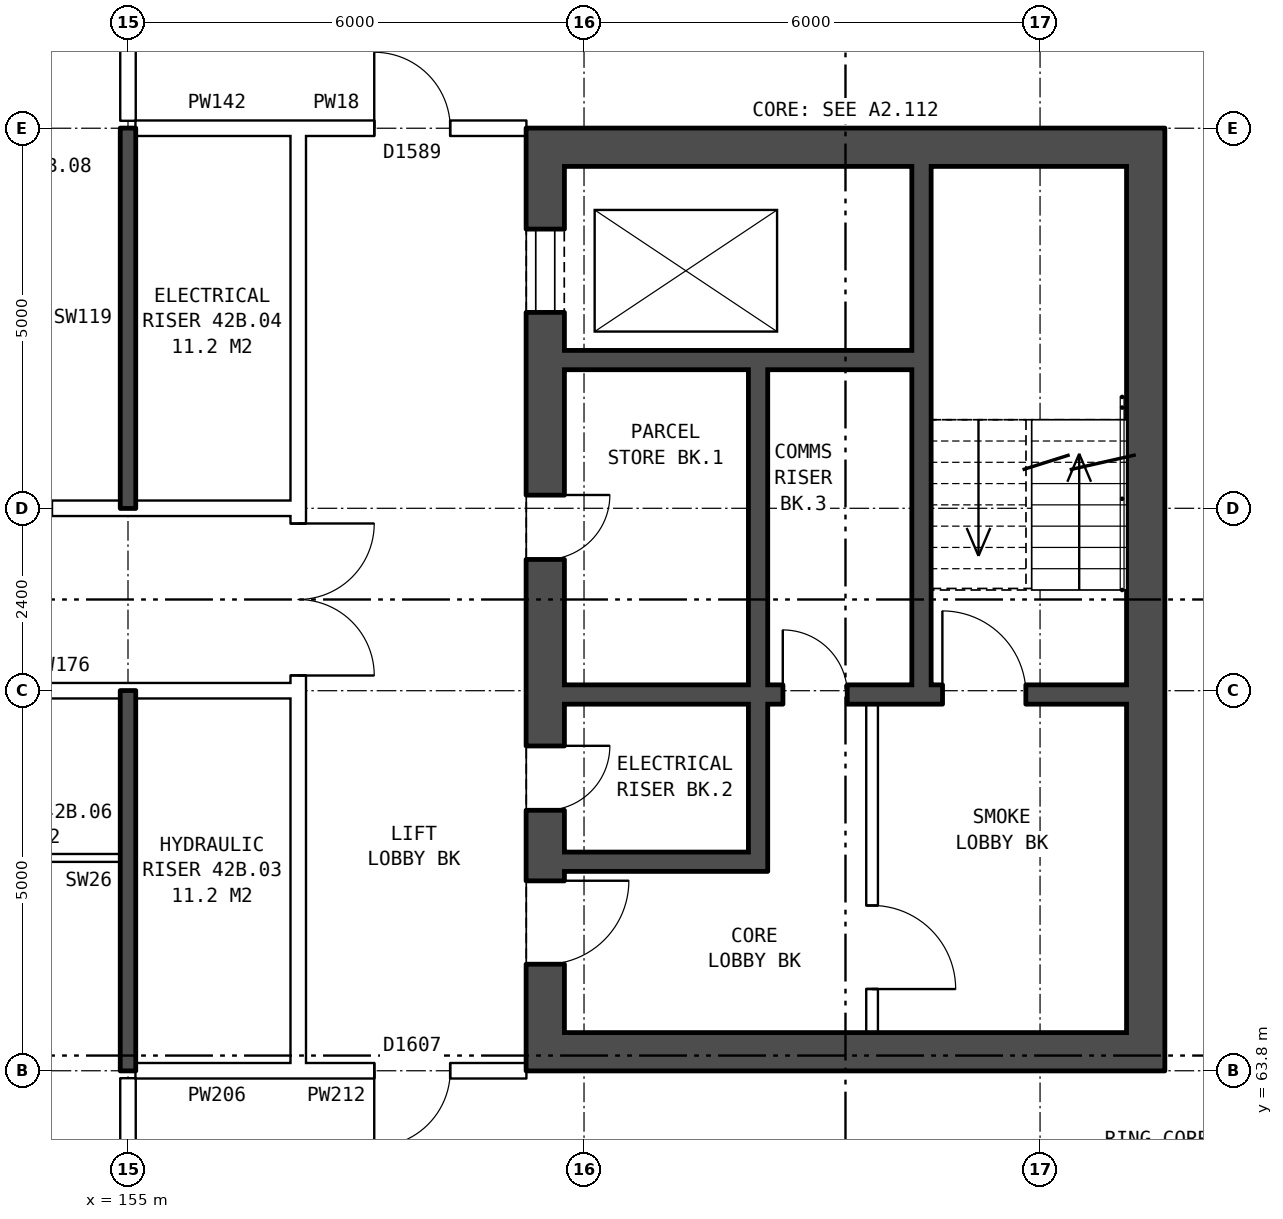
"""IFC4 building model, lengths in metres.
Left out: names, types, materials, properties, quantities, classifications, styles, units other than length and angle.
Written with IfcOpenShell. Run it as: python <this file> out.ifc"""

import sys

from ifc_helpers import new_model, si_unit, direction, frame, frame_2d, origin, place, context, subcontext, project, spatial, rectangle, extrude, element, fill, save


model = new_model("IFC4")
c1 = context("Model", 3, precision=1e-05, world=origin(), true_north=direction((0.0, 1.0)))
c2 = subcontext(c1, "Body", "Model", "MODEL_VIEW")
j1 = project(units=[si_unit("LENGTHUNIT", "METRE"), si_unit("PLANEANGLEUNIT", "RADIAN")], contexts=[c1])
p1 = place(None, origin())
s1 = spatial("IfcSite", under=j1, at=p1, CompositionType="ELEMENT")
p2 = place(p1, origin())
s2 = spatial("IfcBuilding", under=s1, at=p2, CompositionType="ELEMENT")
p3 = place(p2, frame((0.0, 0.0, 151.6)))
s3 = spatial("IfcBuildingStorey", under=s2, at=p3, CompositionType="ELEMENT", Elevation=151.6)
p4 = place(p3, frame((160.49, 76.2, 0.0), z_axis=(0.0, 0.0, 1.0), x_axis=(0.0, -1.0, 0.0)))
e1 = element("IfcWall", 1, at=p4, inside=s3, PredefinedType="SHEAR", context=c2, shape_type="SweptSolid", body=[
    extrude(rectangle(XDim=12.4, YDim=0.5, at=frame_2d((6.2, 0.0))), origin(), (0.0, 0.0, 1.0), 2.85),
])
p5 = place(p4, frame((1.325, 0.0, 0.0)))
e2 = element("IfcOpeningElement", 2, at=p5, cuts=e1, PredefinedType="OPENING", context=c2, shape_type="SweptSolid", body=[
    extrude(rectangle(XDim=1.1, YDim=2.1, at=frame_2d((0.55, 1.05))), frame((0.0, 0.26, 0.0), z_axis=(0.0, -1.0, 0.0), x_axis=(1.0, 0.0, 0.0)), (0.0, 0.0, 1.0), 0.52),
])
p6 = place(p4, frame((4.825, 0.0, 0.0)))
e3 = element("IfcOpeningElement", 3, at=p6, cuts=e1, PredefinedType="OPENING", context=c2, shape_type="SweptSolid", body=[
    extrude(rectangle(XDim=0.85, YDim=2.1, at=frame_2d((0.425, 1.05))), frame((0.0, 0.26, 0.0), z_axis=(0.0, -1.0, 0.0), x_axis=(1.0, 0.0, 0.0)), (0.0, 0.0, 1.0), 0.52),
])
p7 = place(p4, frame((9.9, 0.0, 0.0)))
e4 = element("IfcOpeningElement", 4, at=p7, cuts=e1, PredefinedType="OPENING", context=c2, shape_type="SweptSolid", body=[
    extrude(rectangle(XDim=1.1, YDim=2.1, at=frame_2d((0.55, 1.05))), frame((0.0, 0.26, 0.0), z_axis=(0.0, -1.0, 0.0), x_axis=(1.0, 0.0, 0.0)), (0.0, 0.0, 1.0), 0.52),
])
p8 = place(p4, frame((8.125, 0.0, 0.0)))
e5 = element("IfcOpeningElement", 5, at=p8, cuts=e1, PredefinedType="OPENING", context=c2, shape_type="SweptSolid", body=[
    extrude(rectangle(XDim=0.85, YDim=2.1, at=frame_2d((0.425, 1.05))), frame((0.0, 0.26, 0.0), z_axis=(0.0, -1.0, 0.0), x_axis=(1.0, 0.0, 0.0)), (0.0, 0.0, 1.0), 0.52),
])
p9 = place(p3, frame((168.39, 76.2, 0.0), z_axis=(0.0, 0.0, 1.0), x_axis=(0.0, -1.0, 0.0)))
e6 = element("IfcWall", 6, at=p9, inside=s3, PredefinedType="SHEAR", context=c2, shape_type="SweptSolid", body=[
    extrude(rectangle(XDim=12.4, YDim=0.5, at=frame_2d((6.2, 0.0))), origin(), (0.0, 0.0, 1.0), 2.85),
])
for number, where, z_axis, x_axis in (
    (7, (160.74, 75.95, 0.0), (0.0, 0.0, 1.0), (1.0, 0.0, 0.0)),
    (8, (160.74, 64.05, 0.0), (0.0, 0.0, 1.0), (1.0, 0.0, 0.0)),
):
    element("IfcWall", number, at=place(p3, frame(where, z_axis=z_axis, x_axis=x_axis)), inside=s3, PredefinedType="SHEAR", context=c2, shape_type="SweptSolid", body=[
        extrude(rectangle(XDim=7.4, YDim=0.5, at=frame_2d((3.7, 0.0))), origin(), (0.0, 0.0, 1.0), 2.85),
    ])
p10 = place(p3, frame((160.74, 73.15, 0.0), z_axis=(0.0, 0.0, 1.0), x_axis=(1.0, 0.0, 0.0)))
e9 = element("IfcWall", 9, at=p10, inside=s3, PredefinedType="SHEAR", context=c2, shape_type="SweptSolid", body=[
    extrude(rectangle(XDim=4.575, YDim=0.25, at=frame_2d((2.288, 0.0))), origin(), (0.0, 0.0, 1.0), 2.85),
])
p11 = place(p3, frame((160.74, 68.75, 0.0), z_axis=(0.0, 0.0, 1.0), x_axis=(1.0, 0.0, 0.0)))
e10 = element("IfcWall", 10, at=p11, inside=s3, PredefinedType="SHEAR", context=c2, shape_type="SweptSolid", body=[
    extrude(rectangle(XDim=7.4, YDim=0.25, at=frame_2d((3.7, 0.0))), origin(), (0.0, 0.0, 1.0), 2.85),
])
p12 = place(p11, frame((4.975, 0.0, 0.0)))
e11 = element("IfcOpeningElement", 11, at=p12, cuts=e10, PredefinedType="OPENING", context=c2, shape_type="SweptSolid", body=[
    extrude(rectangle(XDim=1.1, YDim=2.1, at=frame_2d((0.55, 1.05))), frame((0.0, 0.135, 0.0), z_axis=(0.0, -1.0, 0.0), x_axis=(1.0, 0.0, 0.0)), (0.0, 0.0, 1.0), 0.27),
])
p13 = place(p11, frame((2.875, 0.0, 0.0)))
e12 = element("IfcOpeningElement", 12, at=p13, cuts=e10, PredefinedType="OPENING", context=c2, shape_type="SweptSolid", body=[
    extrude(rectangle(XDim=0.85, YDim=2.1, at=frame_2d((0.425, 1.05))), frame((0.0, 0.135, 0.0), z_axis=(0.0, -1.0, 0.0), x_axis=(1.0, 0.0, 0.0)), (0.0, 0.0, 1.0), 0.27),
])
p14 = place(p3, frame((160.74, 66.55, 0.0), z_axis=(0.0, 0.0, 1.0), x_axis=(1.0, 0.0, 0.0)))
e13 = element("IfcWall", 13, at=p14, inside=s3, PredefinedType="SHEAR", context=c2, shape_type="SweptSolid", body=[
    extrude(rectangle(XDim=2.425, YDim=0.25, at=frame_2d((1.212, 0.0))), origin(), (0.0, 0.0, 1.0), 2.85),
])
p15 = place(p3, frame((163.29, 73.025, 0.0), z_axis=(0.0, 0.0, 1.0), x_axis=(0.0, -1.0, 0.0)))
e14 = element("IfcWall", 14, at=p15, inside=s3, PredefinedType="SHEAR", context=c2, shape_type="SweptSolid", body=[
    extrude(rectangle(XDim=4.15, YDim=0.25, at=frame_2d((2.075, 0.0))), origin(), (0.0, 0.0, 1.0), 2.85),
])
p16 = place(p3, frame((163.29, 68.625, 0.0), z_axis=(0.0, 0.0, 1.0), x_axis=(0.0, -1.0, 0.0)))
e15 = element("IfcWall", 15, at=p16, inside=s3, PredefinedType="SHEAR", context=c2, shape_type="SweptSolid", body=[
    extrude(rectangle(XDim=2.2, YDim=0.25, at=frame_2d((1.1, 0.0))), origin(), (0.0, 0.0, 1.0), 2.85),
])
p17 = place(p3, frame((164.79, 68.625, 0.0), z_axis=(0.0, 0.0, 1.0), x_axis=(0.0, -1.0, 0.0)))
e16 = element("IfcWall", 16, at=p17, inside=s3, PredefinedType="PARTITIONING", context=c2, shape_type="SweptSolid", body=[
    extrude(rectangle(XDim=4.325, YDim=0.15, at=frame_2d((2.163, 0.0))), origin(), (0.0, 0.0, 1.0), 2.85),
])
p18 = place(p17, frame((2.65, 0.0, 0.0)))
e17 = element("IfcOpeningElement", 17, at=p18, cuts=e16, PredefinedType="OPENING", context=c2, shape_type="SweptSolid", body=[
    extrude(rectangle(XDim=1.1, YDim=2.1, at=frame_2d((0.55, 1.05))), frame((0.0, 0.085, 0.0), z_axis=(0.0, -1.0, 0.0), x_axis=(1.0, 0.0, 0.0)), (0.0, 0.0, 1.0), 0.17),
])
p19 = place(p3, frame((165.44, 75.7, 0.0), z_axis=(0.0, 0.0, 1.0), x_axis=(0.0, -1.0, 0.0)))
e18 = element("IfcWall", 18, at=p19, inside=s3, PredefinedType="SHEAR", context=c2, shape_type="SweptSolid", body=[
    extrude(rectangle(XDim=6.825, YDim=0.25, at=frame_2d((3.413, 0.0))), origin(), (0.0, 0.0, 1.0), 2.85),
])
p20 = place(p3, frame((157.24, 63.9, 0.0), z_axis=(0.0, 0.0, 1.0), x_axis=(0.0, 1.0, 0.0)))
e19 = element("IfcWall", 19, at=p20, inside=s3, PredefinedType="PARTITIONING", context=c2, shape_type="SweptSolid", body=[
    extrude(rectangle(XDim=12.2, YDim=0.2, at=frame_2d((6.1, 0.0))), origin(), (0.0, 0.0, 1.0), 2.85),
])
p21 = place(p20, frame((5.1, 0.0, 0.0)))
e20 = element("IfcOpeningElement", 20, at=p21, cuts=e19, PredefinedType="OPENING", context=c2, shape_type="SweptSolid", body=[
    extrude(rectangle(XDim=2.0, YDim=2.1, at=frame_2d((1.0, 1.05))), frame((0.0, 0.11, 0.0), z_axis=(0.0, -1.0, 0.0), x_axis=(1.0, 0.0, 0.0)), (0.0, 0.0, 1.0), 0.22),
])
p22 = place(p3, frame((155.1, 63.8, 0.0), z_axis=(0.0, 0.0, 1.0), x_axis=(1.0, 0.0, 0.0)))
e21 = element("IfcWall", 21, at=p22, inside=s3, PredefinedType="PARTITIONING", context=c2, shape_type="SweptSolid", body=[
    extrude(rectangle(XDim=2.14, YDim=0.2, at=frame_2d((1.07, 0.0))), origin(), (0.0, 0.0, 1.0), 2.85),
])
p23 = place(p3, frame((157.24, 63.8, 0.0), z_axis=(0.0, 0.0, 1.0), x_axis=(1.0, 0.0, 0.0)))
e22 = element("IfcWall", 22, at=p23, inside=s3, PredefinedType="PARTITIONING", context=c2, shape_type="SweptSolid", body=[
    extrude(rectangle(XDim=3.0, YDim=0.2, at=frame_2d((1.5, 0.0))), origin(), (0.0, 0.0, 1.0), 2.85),
])
p24 = place(p23, frame((1.0, 0.0, 0.0)))
e23 = element("IfcOpeningElement", 23, at=p24, cuts=e22, PredefinedType="OPENING", context=c2, shape_type="SweptSolid", body=[
    extrude(rectangle(XDim=1.0, YDim=2.1, at=frame_2d((0.5, 1.05))), frame((0.0, 0.11, 0.0), z_axis=(0.0, -1.0, 0.0), x_axis=(1.0, 0.0, 0.0)), (0.0, 0.0, 1.0), 0.22),
])
p25 = place(p3, frame((152.0, 66.6, 0.0), z_axis=(0.0, 0.0, 1.0), x_axis=(1.0, 0.0, 0.0)))
e24 = element("IfcWall", 24, at=p25, inside=s3, PredefinedType="PARTITIONING", context=c2, shape_type="SweptSolid", body=[
    extrude(rectangle(XDim=2.9, YDim=0.1, at=frame_2d((1.45, 0.0))), origin(), (0.0, 0.0, 1.0), 2.85),
])
p26 = place(p3, frame((142.76, 68.8, 0.0), z_axis=(0.0, 0.0, 1.0), x_axis=(1.0, 0.0, 0.0)))
e25 = element("IfcWall", 25, at=p26, inside=s3, PredefinedType="PARTITIONING", context=c2, shape_type="SweptSolid", body=[
    extrude(rectangle(XDim=14.48, YDim=0.2, at=frame_2d((7.24, 0.0))), origin(), (0.0, 0.0, 1.0), 2.85),
])
p27 = place(p26, frame((1.12, 0.0, 0.0)))
e26 = element("IfcOpeningElement", 26, at=p27, cuts=e25, PredefinedType="OPENING", context=c2, shape_type="SweptSolid", body=[
    extrude(rectangle(XDim=1.0, YDim=2.1, at=frame_2d((0.5, 1.05))), frame((0.0, 0.11, 0.0), z_axis=(0.0, -1.0, 0.0), x_axis=(1.0, 0.0, 0.0)), (0.0, 0.0, 1.0), 0.22),
])
p28 = place(p26, frame((7.24, 0.0, 0.0)))
e27 = element("IfcOpeningElement", 27, at=p28, cuts=e25, PredefinedType="OPENING", context=c2, shape_type="SweptSolid", body=[
    extrude(rectangle(XDim=1.0, YDim=2.1, at=frame_2d((0.5, 1.05))), frame((0.0, 0.11, 0.0), z_axis=(0.0, -1.0, 0.0), x_axis=(1.0, 0.0, 0.0)), (0.0, 0.0, 1.0), 0.22),
])
p29 = place(p3, frame((142.76, 71.2, 0.0), z_axis=(0.0, 0.0, 1.0), x_axis=(1.0, 0.0, 0.0)))
e28 = element("IfcWall", 28, at=p29, inside=s3, PredefinedType="PARTITIONING", context=c2, shape_type="SweptSolid", body=[
    extrude(rectangle(XDim=14.48, YDim=0.2, at=frame_2d((7.24, 0.0))), origin(), (0.0, 0.0, 1.0), 2.85),
])
p30 = place(p29, frame((4.24, 0.0, 0.0)))
e29 = element("IfcOpeningElement", 29, at=p30, cuts=e28, PredefinedType="OPENING", context=c2, shape_type="SweptSolid", body=[
    extrude(rectangle(XDim=1.0, YDim=2.1, at=frame_2d((0.5, 1.05))), frame((0.0, 0.11, 0.0), z_axis=(0.0, -1.0, 0.0), x_axis=(1.0, 0.0, 0.0)), (0.0, 0.0, 1.0), 0.22),
])
p31 = place(p29, frame((10.24, 0.0, 0.0)))
e30 = element("IfcOpeningElement", 30, at=p31, cuts=e28, PredefinedType="OPENING", context=c2, shape_type="SweptSolid", body=[
    extrude(rectangle(XDim=1.0, YDim=2.1, at=frame_2d((0.5, 1.05))), frame((0.0, 0.11, 0.0), z_axis=(0.0, -1.0, 0.0), x_axis=(1.0, 0.0, 0.0)), (0.0, 0.0, 1.0), 0.22),
])
p32 = place(p3, frame((155.1, 76.2, 0.0), z_axis=(0.0, 0.0, 1.0), x_axis=(1.0, 0.0, 0.0)))
e31 = element("IfcWall", 31, at=p32, inside=s3, PredefinedType="PARTITIONING", context=c2, shape_type="SweptSolid", body=[
    extrude(rectangle(XDim=2.14, YDim=0.2, at=frame_2d((1.07, 0.0))), origin(), (0.0, 0.0, 1.0), 2.85),
])
p33 = place(p3, frame((157.24, 76.2, 0.0), z_axis=(0.0, 0.0, 1.0), x_axis=(1.0, 0.0, 0.0)))
e32 = element("IfcWall", 32, at=p33, inside=s3, PredefinedType="PARTITIONING", context=c2, shape_type="SweptSolid", body=[
    extrude(rectangle(XDim=3.0, YDim=0.2, at=frame_2d((1.5, 0.0))), origin(), (0.0, 0.0, 1.0), 2.85),
])
p34 = place(p33, frame((1.0, 0.0, 0.0)))
e33 = element("IfcOpeningElement", 33, at=p34, cuts=e32, PredefinedType="OPENING", context=c2, shape_type="SweptSolid", body=[
    extrude(rectangle(XDim=1.0, YDim=2.1, at=frame_2d((0.5, 1.05))), frame((0.0, 0.11, 0.0), z_axis=(0.0, -1.0, 0.0), x_axis=(1.0, 0.0, 0.0)), (0.0, 0.0, 1.0), 0.22),
])
p35 = place(p3, frame((155.0, 61.5, 0.0), z_axis=(0.0, 0.0, 1.0), x_axis=(0.0, 1.0, 0.0)))
e34 = element("IfcWall", 34, at=p35, inside=s3, PredefinedType="PARTITIONING", context=c2, shape_type="SweptSolid", body=[
    extrude(rectangle(XDim=2.2, YDim=0.2, at=frame_2d((1.1, 0.0))), origin(), (0.0, 0.0, 1.0), 2.85),
])
for number, where, z_axis, x_axis in (
    (35, (155.0, 63.8, 0.0), (0.0, 0.0, 1.0), (0.0, 1.0, 0.0)),
    (36, (155.0, 71.2, 0.0), (0.0, 0.0, 1.0), (0.0, 1.0, 0.0)),
):
    element("IfcWall", number, at=place(p3, frame(where, z_axis=z_axis, x_axis=x_axis)), inside=s3, PredefinedType="SOLIDWALL", context=c2, shape_type="SweptSolid", body=[
        extrude(rectangle(XDim=5.0, YDim=0.2, at=frame_2d((2.5, 0.0))), origin(), (0.0, 0.0, 1.0), 2.85),
    ])
p36 = place(p3, frame((155.0, 76.3, 0.0), z_axis=(0.0, 0.0, 1.0), x_axis=(0.0, 1.0, 0.0)))
e37 = element("IfcWall", 37, at=p36, inside=s3, PredefinedType="PARTITIONING", context=c2, shape_type="SweptSolid", body=[
    extrude(rectangle(XDim=2.2, YDim=0.2, at=frame_2d((1.1, 0.0))), origin(), (0.0, 0.0, 1.0), 2.85),
])
p37 = place(p5, origin())
e38 = element("IfcDoor", 38, at=p37, inside=s3, OperationType="DOUBLE_DOOR_SLIDING", PredefinedType="DOOR", context=c2, shape_type="SweptSolid", body=[
    extrude(rectangle(XDim=1.1, YDim=2.1, at=frame_2d((0.55, 1.05))), frame((0.0, 0.235, 0.0), z_axis=(0.0, -1.0, 0.0), x_axis=(1.0, 0.0, 0.0)), (0.0, 0.0, 1.0), 0.05),
])
fill(e2, e38)
p38 = place(p6, origin())
e39 = element("IfcDoor", 39, at=p38, inside=s3, OperationType="SINGLE_SWING_LEFT", PredefinedType="DOOR", context=c2, shape_type="SweptSolid", body=[
    extrude(rectangle(XDim=0.85, YDim=2.1, at=frame_2d((0.425, 1.05))), frame((0.0, 0.235, 0.0), z_axis=(0.0, -1.0, 0.0), x_axis=(1.0, 0.0, 0.0)), (0.0, 0.0, 1.0), 0.05),
])
fill(e3, e39)
p39 = place(p7, origin())
e40 = element("IfcDoor", 40, at=p39, inside=s3, OperationType="SINGLE_SWING_LEFT", PredefinedType="DOOR", context=c2, shape_type="SweptSolid", body=[
    extrude(rectangle(XDim=1.1, YDim=2.1, at=frame_2d((0.55, 1.05))), frame((0.0, 0.235, 0.0), z_axis=(0.0, -1.0, 0.0), x_axis=(1.0, 0.0, 0.0)), (0.0, 0.0, 1.0), 0.05),
])
fill(e4, e40)
p40 = place(p18, origin())
e41 = element("IfcDoor", 41, at=p40, inside=s3, OperationType="SINGLE_SWING_RIGHT", PredefinedType="DOOR", context=c2, shape_type="SweptSolid", body=[
    extrude(rectangle(XDim=1.1, YDim=2.1, at=frame_2d((0.55, 1.05))), frame((0.0, 0.025, 0.0), z_axis=(0.0, -1.0, 0.0), x_axis=(1.0, 0.0, 0.0)), (0.0, 0.0, 1.0), 0.05),
])
fill(e17, e41)
p41 = place(p12, origin())
e42 = element("IfcDoor", 42, at=p41, inside=s3, OperationType="SINGLE_SWING_LEFT", PredefinedType="DOOR", context=c2, shape_type="SweptSolid", body=[
    extrude(rectangle(XDim=1.1, YDim=2.1, at=frame_2d((0.55, 1.05))), frame((0.0, 0.025, 0.0), z_axis=(0.0, -1.0, 0.0), x_axis=(1.0, 0.0, 0.0)), (0.0, 0.0, 1.0), 0.05),
])
fill(e11, e42)
p42 = place(p8, origin())
e43 = element("IfcDoor", 43, at=p42, inside=s3, OperationType="SINGLE_SWING_LEFT", PredefinedType="DOOR", context=c2, shape_type="SweptSolid", body=[
    extrude(rectangle(XDim=0.85, YDim=2.1, at=frame_2d((0.425, 1.05))), frame((0.0, 0.235, 0.0), z_axis=(0.0, -1.0, 0.0), x_axis=(1.0, 0.0, 0.0)), (0.0, 0.0, 1.0), 0.05),
])
fill(e5, e43)
p43 = place(p13, origin())
e44 = element("IfcDoor", 44, at=p43, inside=s3, OperationType="SINGLE_SWING_LEFT", PredefinedType="DOOR", context=c2, shape_type="SweptSolid", body=[
    extrude(rectangle(XDim=0.85, YDim=2.1, at=frame_2d((0.425, 1.05))), frame((0.0, 0.025, 0.0), z_axis=(0.0, -1.0, 0.0), x_axis=(1.0, 0.0, 0.0)), (0.0, 0.0, 1.0), 0.05),
])
fill(e12, e44)
p44 = place(p21, frame((2.0, 0.0, 0.0), z_axis=(0.0, 0.0, 1.0), x_axis=(-1.0, 0.0, 0.0)))
e45 = element("IfcDoor", 45, at=p44, inside=s3, OperationType="DOUBLE_DOOR_SINGLE_SWING", PredefinedType="DOOR", context=c2, shape_type="SweptSolid", body=[
    extrude(rectangle(XDim=2.0, YDim=2.1, at=frame_2d((1.0, 1.05))), frame((0.0, 0.025, 0.0), z_axis=(0.0, -1.0, 0.0), x_axis=(1.0, 0.0, 0.0)), (0.0, 0.0, 1.0), 0.05),
])
fill(e20, e45)
p45 = place(p24, frame((1.0, 0.0, 0.0), z_axis=(0.0, 0.0, 1.0), x_axis=(-1.0, 0.0, 0.0)))
e46 = element("IfcDoor", 46, at=p45, inside=s3, OperationType="SINGLE_SWING_RIGHT", PredefinedType="DOOR", context=c2, shape_type="SweptSolid", body=[
    extrude(rectangle(XDim=1.0, YDim=2.1, at=frame_2d((0.5, 1.05))), frame((0.0, 0.025, 0.0), z_axis=(0.0, -1.0, 0.0), x_axis=(1.0, 0.0, 0.0)), (0.0, 0.0, 1.0), 0.05),
])
fill(e23, e46)
p46 = place(p34, origin())
e47 = element("IfcDoor", 47, at=p46, inside=s3, OperationType="SINGLE_SWING_LEFT", PredefinedType="DOOR", context=c2, shape_type="SweptSolid", body=[
    extrude(rectangle(XDim=1.0, YDim=2.1, at=frame_2d((0.5, 1.05))), frame((0.0, 0.025, 0.0), z_axis=(0.0, -1.0, 0.0), x_axis=(1.0, 0.0, 0.0)), (0.0, 0.0, 1.0), 0.05),
])
fill(e33, e47)
save(model, sys.argv[1])
